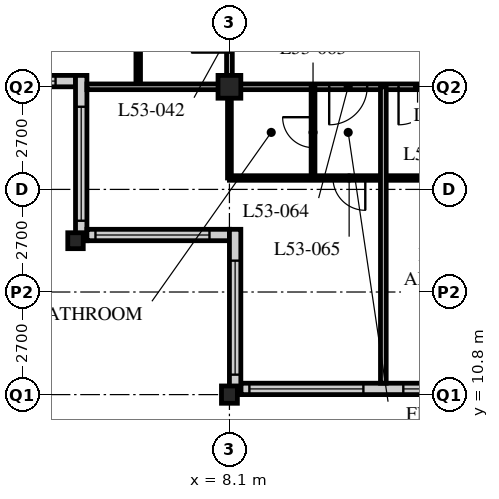
"""IFC4 building model, lengths in metres.
Left out: names, types, materials, properties, quantities, classifications, styles, units other than length and angle.
Written with IfcOpenShell. Run it as: python <this file> out.ifc"""

import sys

from ifc_helpers import new_model, si_unit, direction, frame, frame_2d, origin, origin_2d, place, context, subcontext, project, spatial, rectangle, hollow_rectangle, i_section, extrude, element, fill, save


model = new_model("IFC4")
c1 = context("Model", 3, precision=1e-05, world=origin(), true_north=direction((0.0, 1.0)))
c2 = subcontext(c1, "Body", "Model", "MODEL_VIEW")
j1 = project(units=[si_unit("LENGTHUNIT", "METRE"), si_unit("PLANEANGLEUNIT", "RADIAN")], contexts=[c1])
p1 = place(None, origin())
s1 = spatial("IfcSite", under=j1, at=p1, CompositionType="ELEMENT")
p2 = place(p1, origin())
s2 = spatial("IfcBuilding", under=s1, at=p2, CompositionType="ELEMENT")
p3 = place(p2, frame((0.0, 0.0, 206.4)))
s3 = spatial("IfcBuildingStorey", under=s2, at=p3, CompositionType="ELEMENT", Elevation=206.4)
p4 = place(p3, frame((4.05, 14.85, 0.0), z_axis=(0.0, 0.0, 1.0), x_axis=(1.0, 0.0, 0.0)))
e1 = element("IfcColumn", 1, at=p4, inside=s3, PredefinedType="COLUMN", context=c2, shape_type="SweptSolid", body=[
    extrude(i_section(OverallWidth=0.407, OverallDepth=0.419, WebThickness=0.031, FlangeThickness=0.049, FilletRadius=0.015, at=origin_2d()), origin(), (0.0, 0.0, 1.0), 3.6),
])
p5 = place(p3, frame((8.1, 10.8, 0.0), z_axis=(0.0, 0.0, 1.0), x_axis=(1.0, 0.0, 0.0)))
e2 = element("IfcColumn", 2, at=p5, inside=s3, PredefinedType="COLUMN", context=c2, shape_type="SweptSolid", body=[
    extrude(i_section(OverallWidth=0.418, OverallDepth=0.456, WebThickness=0.042, FlangeThickness=0.067, FilletRadius=0.015, at=origin_2d()), origin(), (0.0, 0.0, 1.0), 3.6),
])
p6 = place(p3, frame((8.1, 18.9, 0.0), z_axis=(0.0, 0.0, 1.0), x_axis=(1.0, 0.0, 0.0)))
e3 = element("IfcColumn", 3, at=p6, inside=s3, PredefinedType="COLUMN", context=c2, shape_type="SweptSolid", body=[
    extrude(hollow_rectangle(XDim=0.6, YDim=0.6, WallThickness=0.05, at=origin_2d()), origin(), (0.0, 0.0, 1.0), 3.6),
])
p7 = place(p3, frame((8.4, 10.95, 0.0), z_axis=(0.0, 0.0, 1.0), x_axis=(1.0, 0.0, 0.0)))
e4 = element("IfcWall", 4, at=p7, inside=s3, PredefinedType="SOLIDWALL", context=c2, shape_type="SweptSolid", body=[
    extrude(rectangle(XDim=40.2, YDim=0.3, at=frame_2d((20.1, 0.0))), origin(), (0.0, 0.0, 1.0), 3.39),
])
p8 = place(p7, frame((0.225, 0.0, 0.6)))
e5 = element("IfcOpeningElement", 5, at=p8, cuts=e4, PredefinedType="OPENING", context=c2, shape_type="SweptSolid", body=[
    extrude(rectangle(XDim=3.0, YDim=2.4, at=frame_2d((1.5, 1.2))), frame((0.0, 0.16, 0.0), z_axis=(0.0, -1.0, 0.0), x_axis=(1.0, 0.0, 0.0)), (0.0, 0.0, 1.0), 0.32),
])
p9 = place(p7, frame((4.275, 0.0, 0.6)))
e6 = element("IfcOpeningElement", 6, at=p9, cuts=e4, PredefinedType="OPENING", context=c2, shape_type="SweptSolid", body=[
    extrude(rectangle(XDim=3.0, YDim=2.4, at=frame_2d((1.5, 1.2))), frame((0.0, 0.16, 0.0), z_axis=(0.0, -1.0, 0.0), x_axis=(1.0, 0.0, 0.0)), (0.0, 0.0, 1.0), 0.32),
])
p10 = place(p7, frame((8.325, 0.0, 0.6)))
e7 = element("IfcOpeningElement", 7, at=p10, cuts=e4, PredefinedType="OPENING", context=c2, shape_type="SweptSolid", body=[
    extrude(rectangle(XDim=3.0, YDim=2.4, at=frame_2d((1.5, 1.2))), frame((0.0, 0.16, 0.0), z_axis=(0.0, -1.0, 0.0), x_axis=(1.0, 0.0, 0.0)), (0.0, 0.0, 1.0), 0.32),
])
p11 = place(p7, frame((12.375, 0.0, 0.6)))
e8 = element("IfcOpeningElement", 8, at=p11, cuts=e4, PredefinedType="OPENING", context=c2, shape_type="SweptSolid", body=[
    extrude(rectangle(XDim=3.0, YDim=2.4, at=frame_2d((1.5, 1.2))), frame((0.0, 0.16, 0.0), z_axis=(0.0, -1.0, 0.0), x_axis=(1.0, 0.0, 0.0)), (0.0, 0.0, 1.0), 0.32),
])
p12 = place(p7, frame((16.425, 0.0, 0.6)))
e9 = element("IfcOpeningElement", 9, at=p12, cuts=e4, PredefinedType="OPENING", context=c2, shape_type="SweptSolid", body=[
    extrude(rectangle(XDim=3.0, YDim=2.4, at=frame_2d((1.5, 1.2))), frame((0.0, 0.16, 0.0), z_axis=(0.0, -1.0, 0.0), x_axis=(1.0, 0.0, 0.0)), (0.0, 0.0, 1.0), 0.32),
])
p13 = place(p7, frame((20.475, 0.0, 0.6)))
e10 = element("IfcOpeningElement", 10, at=p13, cuts=e4, PredefinedType="OPENING", context=c2, shape_type="SweptSolid", body=[
    extrude(rectangle(XDim=3.0, YDim=2.4, at=frame_2d((1.5, 1.2))), frame((0.0, 0.16, 0.0), z_axis=(0.0, -1.0, 0.0), x_axis=(1.0, 0.0, 0.0)), (0.0, 0.0, 1.0), 0.32),
])
p14 = place(p7, frame((24.525, 0.0, 0.6)))
e11 = element("IfcOpeningElement", 11, at=p14, cuts=e4, PredefinedType="OPENING", context=c2, shape_type="SweptSolid", body=[
    extrude(rectangle(XDim=3.0, YDim=2.4, at=frame_2d((1.5, 1.2))), frame((0.0, 0.16, 0.0), z_axis=(0.0, -1.0, 0.0), x_axis=(1.0, 0.0, 0.0)), (0.0, 0.0, 1.0), 0.32),
])
p15 = place(p7, frame((28.575, 0.0, 0.6)))
e12 = element("IfcOpeningElement", 12, at=p15, cuts=e4, PredefinedType="OPENING", context=c2, shape_type="SweptSolid", body=[
    extrude(rectangle(XDim=3.0, YDim=2.4, at=frame_2d((1.5, 1.2))), frame((0.0, 0.16, 0.0), z_axis=(0.0, -1.0, 0.0), x_axis=(1.0, 0.0, 0.0)), (0.0, 0.0, 1.0), 0.32),
])
p16 = place(p7, frame((32.625, 0.0, 0.6)))
e13 = element("IfcOpeningElement", 13, at=p16, cuts=e4, PredefinedType="OPENING", context=c2, shape_type="SweptSolid", body=[
    extrude(rectangle(XDim=3.0, YDim=2.4, at=frame_2d((1.5, 1.2))), frame((0.0, 0.16, 0.0), z_axis=(0.0, -1.0, 0.0), x_axis=(1.0, 0.0, 0.0)), (0.0, 0.0, 1.0), 0.32),
])
p17 = place(p7, frame((36.675, 0.0, 0.6)))
e14 = element("IfcOpeningElement", 14, at=p17, cuts=e4, PredefinedType="OPENING", context=c2, shape_type="SweptSolid", body=[
    extrude(rectangle(XDim=3.0, YDim=2.4, at=frame_2d((1.5, 1.2))), frame((0.0, 0.16, 0.0), z_axis=(0.0, -1.0, 0.0), x_axis=(1.0, 0.0, 0.0)), (0.0, 0.0, 1.0), 0.32),
])
p18 = place(p3, frame((0.3, 19.05, 0.0), z_axis=(0.0, 0.0, 1.0), x_axis=(1.0, 0.0, 0.0)))
e15 = element("IfcWall", 15, at=p18, inside=s3, PredefinedType="SOLIDWALL", context=c2, shape_type="SweptSolid", body=[
    extrude(rectangle(XDim=3.75, YDim=0.3, at=frame_2d((1.875, 0.0))), origin(), (0.0, 0.0, 1.0), 3.39),
])
p19 = place(p18, frame((0.225, 0.0, 0.6)))
e16 = element("IfcOpeningElement", 16, at=p19, cuts=e15, PredefinedType="OPENING", context=c2, shape_type="SweptSolid", body=[
    extrude(rectangle(XDim=3.0, YDim=2.0, at=frame_2d((1.5, 1.0))), frame((0.0, 0.16, 0.0), z_axis=(0.0, -1.0, 0.0), x_axis=(1.0, 0.0, 0.0)), (0.0, 0.0, 1.0), 0.32),
])
p20 = place(p3, frame((4.2, 19.2, 0.0), z_axis=(0.0, 0.0, 1.0), x_axis=(0.0, -1.0, 0.0)))
e17 = element("IfcWall", 17, at=p20, inside=s3, PredefinedType="SOLIDWALL", context=c2, shape_type="SweptSolid", body=[
    extrude(rectangle(XDim=4.35, YDim=0.3, at=frame_2d((2.175, 0.0))), origin(), (0.0, 0.0, 1.0), 3.39),
])
p21 = place(p20, frame((0.825, 0.0, 0.6)))
e18 = element("IfcOpeningElement", 18, at=p21, cuts=e17, PredefinedType="OPENING", context=c2, shape_type="SweptSolid", body=[
    extrude(rectangle(XDim=3.0, YDim=2.0, at=frame_2d((1.5, 1.0))), frame((0.0, 0.16, 0.0), z_axis=(0.0, -1.0, 0.0), x_axis=(1.0, 0.0, 0.0)), (0.0, 0.0, 1.0), 0.32),
])
p22 = place(p3, frame((4.35, 15.0, 0.0), z_axis=(0.0, 0.0, 1.0), x_axis=(1.0, 0.0, 0.0)))
e19 = element("IfcWall", 19, at=p22, inside=s3, PredefinedType="SOLIDWALL", context=c2, shape_type="SweptSolid", body=[
    extrude(rectangle(XDim=3.75, YDim=0.3, at=frame_2d((1.875, 0.0))), origin(), (0.0, 0.0, 1.0), 3.39),
])
p23 = place(p22, frame((0.225, 0.0, 0.6)))
e20 = element("IfcOpeningElement", 20, at=p23, cuts=e19, PredefinedType="OPENING", context=c2, shape_type="SweptSolid", body=[
    extrude(rectangle(XDim=3.0, YDim=2.0, at=frame_2d((1.5, 1.0))), frame((0.0, 0.16, 0.0), z_axis=(0.0, -1.0, 0.0), x_axis=(1.0, 0.0, 0.0)), (0.0, 0.0, 1.0), 0.32),
])
p24 = place(p3, frame((8.25, 15.15, 0.0), z_axis=(0.0, 0.0, 1.0), x_axis=(0.0, -1.0, 0.0)))
e21 = element("IfcWall", 21, at=p24, inside=s3, PredefinedType="SOLIDWALL", context=c2, shape_type="SweptSolid", body=[
    extrude(rectangle(XDim=4.35, YDim=0.3, at=frame_2d((2.175, 0.0))), origin(), (0.0, 0.0, 1.0), 3.39),
])
p25 = place(p24, frame((0.825, 0.0, 0.6)))
e22 = element("IfcOpeningElement", 22, at=p25, cuts=e21, PredefinedType="OPENING", context=c2, shape_type="SweptSolid", body=[
    extrude(rectangle(XDim=3.0, YDim=2.0, at=frame_2d((1.5, 1.0))), frame((0.0, 0.16, 0.0), z_axis=(0.0, -1.0, 0.0), x_axis=(1.0, 0.0, 0.0)), (0.0, 0.0, 1.0), 0.32),
])
p26 = place(p3, frame((8.1, 18.9, 0.0), z_axis=(0.0, 0.0, 1.0), x_axis=(1.0, 0.0, 0.0)))
e23 = element("IfcWall", 23, at=p26, inside=s3, PredefinedType="PARTITIONING", context=c2, shape_type="SweptSolid", body=[
    extrude(rectangle(XDim=36.45, YDim=0.15, at=frame_2d((18.225, 0.0))), origin(), (0.0, 0.0, 1.0), 2.778),
])
p27 = place(p26, frame((4.45, 0.0, 0.0)))
e24 = element("IfcOpeningElement", 24, at=p27, cuts=e23, PredefinedType="OPENING", context=c2, shape_type="SweptSolid", body=[
    extrude(rectangle(XDim=1.0, YDim=2.1, at=frame_2d((0.5, 1.05))), frame((0.0, 0.085, 0.0), z_axis=(0.0, -1.0, 0.0), x_axis=(1.0, 0.0, 0.0)), (0.0, 0.0, 1.0), 0.17),
])
p28 = place(p26, frame((12.55, 0.0, 0.0)))
e25 = element("IfcOpeningElement", 25, at=p28, cuts=e23, PredefinedType="OPENING", context=c2, shape_type="SweptSolid", body=[
    extrude(rectangle(XDim=1.0, YDim=2.1, at=frame_2d((0.5, 1.05))), frame((0.0, 0.085, 0.0), z_axis=(0.0, -1.0, 0.0), x_axis=(1.0, 0.0, 0.0)), (0.0, 0.0, 1.0), 0.17),
])
p29 = place(p26, frame((29.05, 0.0, 0.0)))
e26 = element("IfcOpeningElement", 26, at=p29, cuts=e23, PredefinedType="OPENING", context=c2, shape_type="SweptSolid", body=[
    extrude(rectangle(XDim=1.0, YDim=2.1, at=frame_2d((0.5, 1.05))), frame((0.0, 0.085, 0.0), z_axis=(0.0, -1.0, 0.0), x_axis=(1.0, 0.0, 0.0)), (0.0, 0.0, 1.0), 0.17),
])
p30 = place(p26, frame((2.625, 0.0, 0.0)))
e27 = element("IfcOpeningElement", 27, at=p30, cuts=e23, PredefinedType="OPENING", context=c2, shape_type="SweptSolid", body=[
    extrude(rectangle(XDim=1.0, YDim=2.1, at=frame_2d((0.5, 1.05))), frame((0.0, 0.085, 0.0), z_axis=(0.0, -1.0, 0.0), x_axis=(1.0, 0.0, 0.0)), (0.0, 0.0, 1.0), 0.17),
])
p31 = place(p26, frame((33.925, 0.0, 0.0)))
e28 = element("IfcOpeningElement", 28, at=p31, cuts=e23, PredefinedType="OPENING", context=c2, shape_type="SweptSolid", body=[
    extrude(rectangle(XDim=1.0, YDim=2.1, at=frame_2d((0.5, 1.05))), frame((0.0, 0.085, 0.0), z_axis=(0.0, -1.0, 0.0), x_axis=(1.0, 0.0, 0.0)), (0.0, 0.0, 1.0), 0.17),
])
p32 = place(p3, frame((8.1, 18.9, 0.0), z_axis=(0.0, 0.0, 1.0), x_axis=(0.0, 1.0, 0.0)))
e29 = element("IfcWall", 29, at=p32, inside=s3, PredefinedType="PARTITIONING", context=c2, shape_type="SweptSolid", body=[
    extrude(rectangle(XDim=28.35, YDim=0.15, at=frame_2d((14.175, 0.0))), origin(), (0.0, 0.0, 1.0), 2.778),
])
p33 = place(p32, frame((0.9, 0.0, 0.0)))
e30 = element("IfcOpeningElement", 30, at=p33, cuts=e29, PredefinedType="OPENING", context=c2, shape_type="SweptSolid", body=[
    extrude(rectangle(XDim=1.0, YDim=2.1, at=frame_2d((0.5, 1.05))), frame((0.0, 0.085, 0.0), z_axis=(0.0, -1.0, 0.0), x_axis=(1.0, 0.0, 0.0)), (0.0, 0.0, 1.0), 0.17),
])
p34 = place(p32, frame((17.1, 0.0, 0.0)))
e31 = element("IfcOpeningElement", 31, at=p34, cuts=e29, PredefinedType="OPENING", context=c2, shape_type="SweptSolid", body=[
    extrude(rectangle(XDim=1.0, YDim=2.1, at=frame_2d((0.5, 1.05))), frame((0.0, 0.085, 0.0), z_axis=(0.0, -1.0, 0.0), x_axis=(1.0, 0.0, 0.0)), (0.0, 0.0, 1.0), 0.17),
])
p35 = place(p32, frame((26.65, 0.0, 0.0)))
e32 = element("IfcOpeningElement", 32, at=p35, cuts=e29, PredefinedType="OPENING", context=c2, shape_type="SweptSolid", body=[
    extrude(rectangle(XDim=1.0, YDim=2.1, at=frame_2d((0.5, 1.05))), frame((0.0, 0.085, 0.0), z_axis=(0.0, -1.0, 0.0), x_axis=(1.0, 0.0, 0.0)), (0.0, 0.0, 1.0), 0.17),
])
p36 = place(p3, frame((5.7, 18.9, 0.0), z_axis=(0.0, 0.0, 1.0), x_axis=(0.0, 1.0, 0.0)))
e33 = element("IfcWall", 33, at=p36, inside=s3, PredefinedType="PARTITIONING", context=c2, shape_type="SweptSolid", body=[
    extrude(rectangle(XDim=24.3, YDim=0.12, at=frame_2d((12.15, 0.0))), origin(), (0.0, 0.0, 1.0), 3.39),
])
p37 = place(p36, frame((0.975, 0.0, 0.0)))
e34 = element("IfcOpeningElement", 34, at=p37, cuts=e33, PredefinedType="OPENING", context=c2, shape_type="SweptSolid", body=[
    extrude(rectangle(XDim=0.85, YDim=2.1, at=frame_2d((0.425, 1.05))), frame((0.0, 0.07, 0.0), z_axis=(0.0, -1.0, 0.0), x_axis=(1.0, 0.0, 0.0)), (0.0, 0.0, 1.0), 0.14),
])
p38 = place(p36, frame((8.425, 0.0, 0.0)))
e35 = element("IfcOpeningElement", 35, at=p38, cuts=e33, PredefinedType="OPENING", context=c2, shape_type="SweptSolid", body=[
    extrude(rectangle(XDim=0.85, YDim=2.1, at=frame_2d((0.425, 1.05))), frame((0.0, 0.07, 0.0), z_axis=(0.0, -1.0, 0.0), x_axis=(1.0, 0.0, 0.0)), (0.0, 0.0, 1.0), 0.14),
])
p39 = place(p36, frame((12.475, 0.0, 0.0)))
e36 = element("IfcOpeningElement", 36, at=p39, cuts=e33, PredefinedType="OPENING", context=c2, shape_type="SweptSolid", body=[
    extrude(rectangle(XDim=0.85, YDim=2.1, at=frame_2d((0.425, 1.05))), frame((0.0, 0.07, 0.0), z_axis=(0.0, -1.0, 0.0), x_axis=(1.0, 0.0, 0.0)), (0.0, 0.0, 1.0), 0.14),
])
p40 = place(p36, frame((17.175, 0.0, 0.0)))
e37 = element("IfcOpeningElement", 37, at=p40, cuts=e33, PredefinedType="OPENING", context=c2, shape_type="SweptSolid", body=[
    extrude(rectangle(XDim=0.85, YDim=2.1, at=frame_2d((0.425, 1.05))), frame((0.0, 0.07, 0.0), z_axis=(0.0, -1.0, 0.0), x_axis=(1.0, 0.0, 0.0)), (0.0, 0.0, 1.0), 0.14),
])
p41 = place(p36, frame((20.575, 0.0, 0.0)))
e38 = element("IfcOpeningElement", 38, at=p41, cuts=e33, PredefinedType="OPENING", context=c2, shape_type="SweptSolid", body=[
    extrude(rectangle(XDim=0.85, YDim=2.1, at=frame_2d((0.425, 1.05))), frame((0.0, 0.07, 0.0), z_axis=(0.0, -1.0, 0.0), x_axis=(1.0, 0.0, 0.0)), (0.0, 0.0, 1.0), 0.14),
])
p42 = place(p3, frame((8.1, 16.5, 0.0), z_axis=(0.0, 0.0, 1.0), x_axis=(1.0, 0.0, 0.0)))
e39 = element("IfcWall", 39, at=p42, inside=s3, PredefinedType="PARTITIONING", context=c2, shape_type="SweptSolid", body=[
    extrude(rectangle(XDim=28.35, YDim=0.12, at=frame_2d((14.175, 0.0))), origin(), (0.0, 0.0, 1.0), 3.39),
])
p43 = place(p42, frame((5.025, 0.0, 0.0)))
e40 = element("IfcOpeningElement", 40, at=p43, cuts=e39, PredefinedType="OPENING", context=c2, shape_type="SweptSolid", body=[
    extrude(rectangle(XDim=0.85, YDim=2.1, at=frame_2d((0.425, 1.05))), frame((0.0, 0.07, 0.0), z_axis=(0.0, -1.0, 0.0), x_axis=(1.0, 0.0, 0.0)), (0.0, 0.0, 1.0), 0.14),
])
p44 = place(p42, frame((8.425, 0.0, 0.0)))
e41 = element("IfcOpeningElement", 41, at=p44, cuts=e39, PredefinedType="OPENING", context=c2, shape_type="SweptSolid", body=[
    extrude(rectangle(XDim=0.85, YDim=2.1, at=frame_2d((0.425, 1.05))), frame((0.0, 0.07, 0.0), z_axis=(0.0, -1.0, 0.0), x_axis=(1.0, 0.0, 0.0)), (0.0, 0.0, 1.0), 0.14),
])
p45 = place(p42, frame((13.125, 0.0, 0.0)))
e42 = element("IfcOpeningElement", 42, at=p45, cuts=e39, PredefinedType="OPENING", context=c2, shape_type="SweptSolid", body=[
    extrude(rectangle(XDim=0.85, YDim=2.1, at=frame_2d((0.425, 1.05))), frame((0.0, 0.07, 0.0), z_axis=(0.0, -1.0, 0.0), x_axis=(1.0, 0.0, 0.0)), (0.0, 0.0, 1.0), 0.14),
])
p46 = place(p42, frame((20.575, 0.0, 0.0)))
e43 = element("IfcOpeningElement", 43, at=p46, cuts=e39, PredefinedType="OPENING", context=c2, shape_type="SweptSolid", body=[
    extrude(rectangle(XDim=0.85, YDim=2.1, at=frame_2d((0.425, 1.05))), frame((0.0, 0.07, 0.0), z_axis=(0.0, -1.0, 0.0), x_axis=(1.0, 0.0, 0.0)), (0.0, 0.0, 1.0), 0.14),
])
p47 = place(p42, frame((24.625, 0.0, 0.0)))
e44 = element("IfcOpeningElement", 44, at=p47, cuts=e39, PredefinedType="OPENING", context=c2, shape_type="SweptSolid", body=[
    extrude(rectangle(XDim=0.85, YDim=2.1, at=frame_2d((0.425, 1.05))), frame((0.0, 0.07, 0.0), z_axis=(0.0, -1.0, 0.0), x_axis=(1.0, 0.0, 0.0)), (0.0, 0.0, 1.0), 0.14),
])
p48 = place(p42, frame((2.725, 0.0, 0.0)))
e45 = element("IfcOpeningElement", 45, at=p48, cuts=e39, PredefinedType="OPENING", context=c2, shape_type="SweptSolid", body=[
    extrude(rectangle(XDim=0.85, YDim=2.1, at=frame_2d((0.425, 1.05))), frame((0.0, 0.07, 0.0), z_axis=(0.0, -1.0, 0.0), x_axis=(1.0, 0.0, 0.0)), (0.0, 0.0, 1.0), 0.14),
])
p49 = place(p3, frame((10.3, 18.9, 0.0), z_axis=(0.0, 0.0, 1.0), x_axis=(0.0, -1.0, 0.0)))
e46 = element("IfcWall", 46, at=p49, inside=s3, PredefinedType="PARTITIONING", context=c2, shape_type="SweptSolid", body=[
    extrude(rectangle(XDim=2.4, YDim=0.1, at=frame_2d((1.2, 0.0))), origin(), (0.0, 0.0, 1.0), 3.39),
])
p50 = place(p49, frame((0.8, 0.0, 0.0)))
e47 = element("IfcOpeningElement", 47, at=p50, cuts=e46, PredefinedType="OPENING", context=c2, shape_type="SweptSolid", body=[
    extrude(rectangle(XDim=0.8, YDim=2.1, at=frame_2d((0.4, 1.05))), frame((0.0, 0.06, 0.0), z_axis=(0.0, -1.0, 0.0), x_axis=(1.0, 0.0, 0.0)), (0.0, 0.0, 1.0), 0.12),
])
p51 = place(p3, frame((8.1, 18.9, 0.0), z_axis=(0.0, 0.0, 1.0), x_axis=(0.0, -1.0, 0.0)))
e48 = element("IfcWall", 48, at=p51, inside=s3, PredefinedType="PARTITIONING", context=c2, shape_type="SweptSolid", body=[
    extrude(rectangle(XDim=2.4, YDim=0.1, at=frame_2d((1.2, 0.0))), origin(), (0.0, 0.0, 1.0), 2.778),
])
p52 = place(p3, frame((4.35, 18.9, 0.0), z_axis=(0.0, 0.0, 1.0), x_axis=(1.0, 0.0, 0.0)))
e49 = element("IfcWall", 49, at=p52, inside=s3, PredefinedType="PARTITIONING", context=c2, shape_type="SweptSolid", body=[
    extrude(rectangle(XDim=3.75, YDim=0.15, at=frame_2d((1.875, 0.0))), origin(), (0.0, 0.0, 1.0), 2.778),
])
p53 = place(p3, frame((12.15, 18.9, 0.0), z_axis=(0.0, 0.0, 1.0), x_axis=(0.0, -1.0, 0.0)))
e50 = element("IfcWall", 50, at=p53, inside=s3, PredefinedType="PARTITIONING", context=c2, shape_type="SweptSolid", body=[
    extrude(rectangle(XDim=7.8, YDim=0.15, at=frame_2d((3.9, 0.0))), origin(), (0.0, 0.0, 1.0), 3.39),
])
p54 = place(p8, origin())
e51 = element("IfcWindow", 51, at=p54, inside=s3, PartitioningType="SINGLE_PANEL", PredefinedType="WINDOW", context=c2, shape_type="SweptSolid", body=[
    extrude(rectangle(XDim=3.0, YDim=2.4, at=frame_2d((1.5, 1.2))), frame((0.0, 0.03, 0.0), z_axis=(0.0, -1.0, 0.0), x_axis=(1.0, 0.0, 0.0)), (0.0, 0.0, 1.0), 0.06),
])
fill(e5, e51)
p55 = place(p9, origin())
e52 = element("IfcWindow", 52, at=p55, inside=s3, PartitioningType="SINGLE_PANEL", PredefinedType="WINDOW", context=c2, shape_type="SweptSolid", body=[
    extrude(rectangle(XDim=3.0, YDim=2.4, at=frame_2d((1.5, 1.2))), frame((0.0, 0.03, 0.0), z_axis=(0.0, -1.0, 0.0), x_axis=(1.0, 0.0, 0.0)), (0.0, 0.0, 1.0), 0.06),
])
fill(e6, e52)
p56 = place(p19, origin())
e53 = element("IfcWindow", 53, at=p56, inside=s3, PartitioningType="SINGLE_PANEL", PredefinedType="WINDOW", context=c2, shape_type="SweptSolid", body=[
    extrude(rectangle(XDim=3.0, YDim=2.0, at=frame_2d((1.5, 1.0))), frame((0.0, 0.03, 0.0), z_axis=(0.0, -1.0, 0.0), x_axis=(1.0, 0.0, 0.0)), (0.0, 0.0, 1.0), 0.06),
])
fill(e16, e53)
p57 = place(p21, origin())
e54 = element("IfcWindow", 54, at=p57, inside=s3, PartitioningType="SINGLE_PANEL", PredefinedType="WINDOW", context=c2, shape_type="SweptSolid", body=[
    extrude(rectangle(XDim=3.0, YDim=2.0, at=frame_2d((1.5, 1.0))), frame((0.0, 0.03, 0.0), z_axis=(0.0, -1.0, 0.0), x_axis=(1.0, 0.0, 0.0)), (0.0, 0.0, 1.0), 0.06),
])
fill(e18, e54)
p58 = place(p23, origin())
e55 = element("IfcWindow", 55, at=p58, inside=s3, PartitioningType="SINGLE_PANEL", PredefinedType="WINDOW", context=c2, shape_type="SweptSolid", body=[
    extrude(rectangle(XDim=3.0, YDim=2.0, at=frame_2d((1.5, 1.0))), frame((0.0, 0.03, 0.0), z_axis=(0.0, -1.0, 0.0), x_axis=(1.0, 0.0, 0.0)), (0.0, 0.0, 1.0), 0.06),
])
fill(e20, e55)
p59 = place(p25, origin())
e56 = element("IfcWindow", 56, at=p59, inside=s3, PartitioningType="SINGLE_PANEL", PredefinedType="WINDOW", context=c2, shape_type="SweptSolid", body=[
    extrude(rectangle(XDim=3.0, YDim=2.0, at=frame_2d((1.5, 1.0))), frame((0.0, 0.03, 0.0), z_axis=(0.0, -1.0, 0.0), x_axis=(1.0, 0.0, 0.0)), (0.0, 0.0, 1.0), 0.06),
])
fill(e22, e56)
p60 = place(p27, origin())
e57 = element("IfcDoor", 57, at=p60, inside=s3, OperationType="SINGLE_SWING_RIGHT", PredefinedType="DOOR", context=c2, shape_type="SweptSolid", body=[
    extrude(rectangle(XDim=1.0, YDim=2.1, at=frame_2d((0.5, 1.05))), frame((0.0, 0.025, 0.0), z_axis=(0.0, -1.0, 0.0), x_axis=(1.0, 0.0, 0.0)), (0.0, 0.0, 1.0), 0.05),
])
fill(e24, e57)
p61 = place(p33, origin())
e58 = element("IfcDoor", 58, at=p61, inside=s3, OperationType="SINGLE_SWING_LEFT", PredefinedType="DOOR", context=c2, shape_type="SweptSolid", body=[
    extrude(rectangle(XDim=1.0, YDim=2.1, at=frame_2d((0.5, 1.05))), frame((0.0, 0.025, 0.0), z_axis=(0.0, -1.0, 0.0), x_axis=(1.0, 0.0, 0.0)), (0.0, 0.0, 1.0), 0.05),
])
fill(e30, e58)
p62 = place(p50, origin())
e59 = element("IfcDoor", 59, at=p62, inside=s3, OperationType="SINGLE_SWING_RIGHT", PredefinedType="DOOR", context=c2, shape_type="SweptSolid", body=[
    extrude(rectangle(XDim=0.8, YDim=2.1, at=frame_2d((0.4, 1.05))), frame((0.0, 0.025, 0.0), z_axis=(0.0, -1.0, 0.0), x_axis=(1.0, 0.0, 0.0)), (0.0, 0.0, 1.0), 0.05),
])
fill(e47, e59)
p63 = place(p30, origin())
e60 = element("IfcDoor", 60, at=p63, inside=s3, OperationType="SINGLE_SWING_RIGHT", PredefinedType="DOOR", context=c2, shape_type="SweptSolid", body=[
    extrude(rectangle(XDim=1.0, YDim=2.1, at=frame_2d((0.5, 1.05))), frame((0.0, 0.025, 0.0), z_axis=(0.0, -1.0, 0.0), x_axis=(1.0, 0.0, 0.0)), (0.0, 0.0, 1.0), 0.05),
])
fill(e27, e60)
p64 = place(p48, origin())
e61 = element("IfcDoor", 61, at=p64, inside=s3, OperationType="SINGLE_SWING_LEFT", PredefinedType="DOOR", context=c2, shape_type="SweptSolid", body=[
    extrude(rectangle(XDim=0.85, YDim=2.1, at=frame_2d((0.425, 1.05))), frame((0.0, 0.025, 0.0), z_axis=(0.0, -1.0, 0.0), x_axis=(1.0, 0.0, 0.0)), (0.0, 0.0, 1.0), 0.05),
])
fill(e45, e61)
save(model, sys.argv[1])
